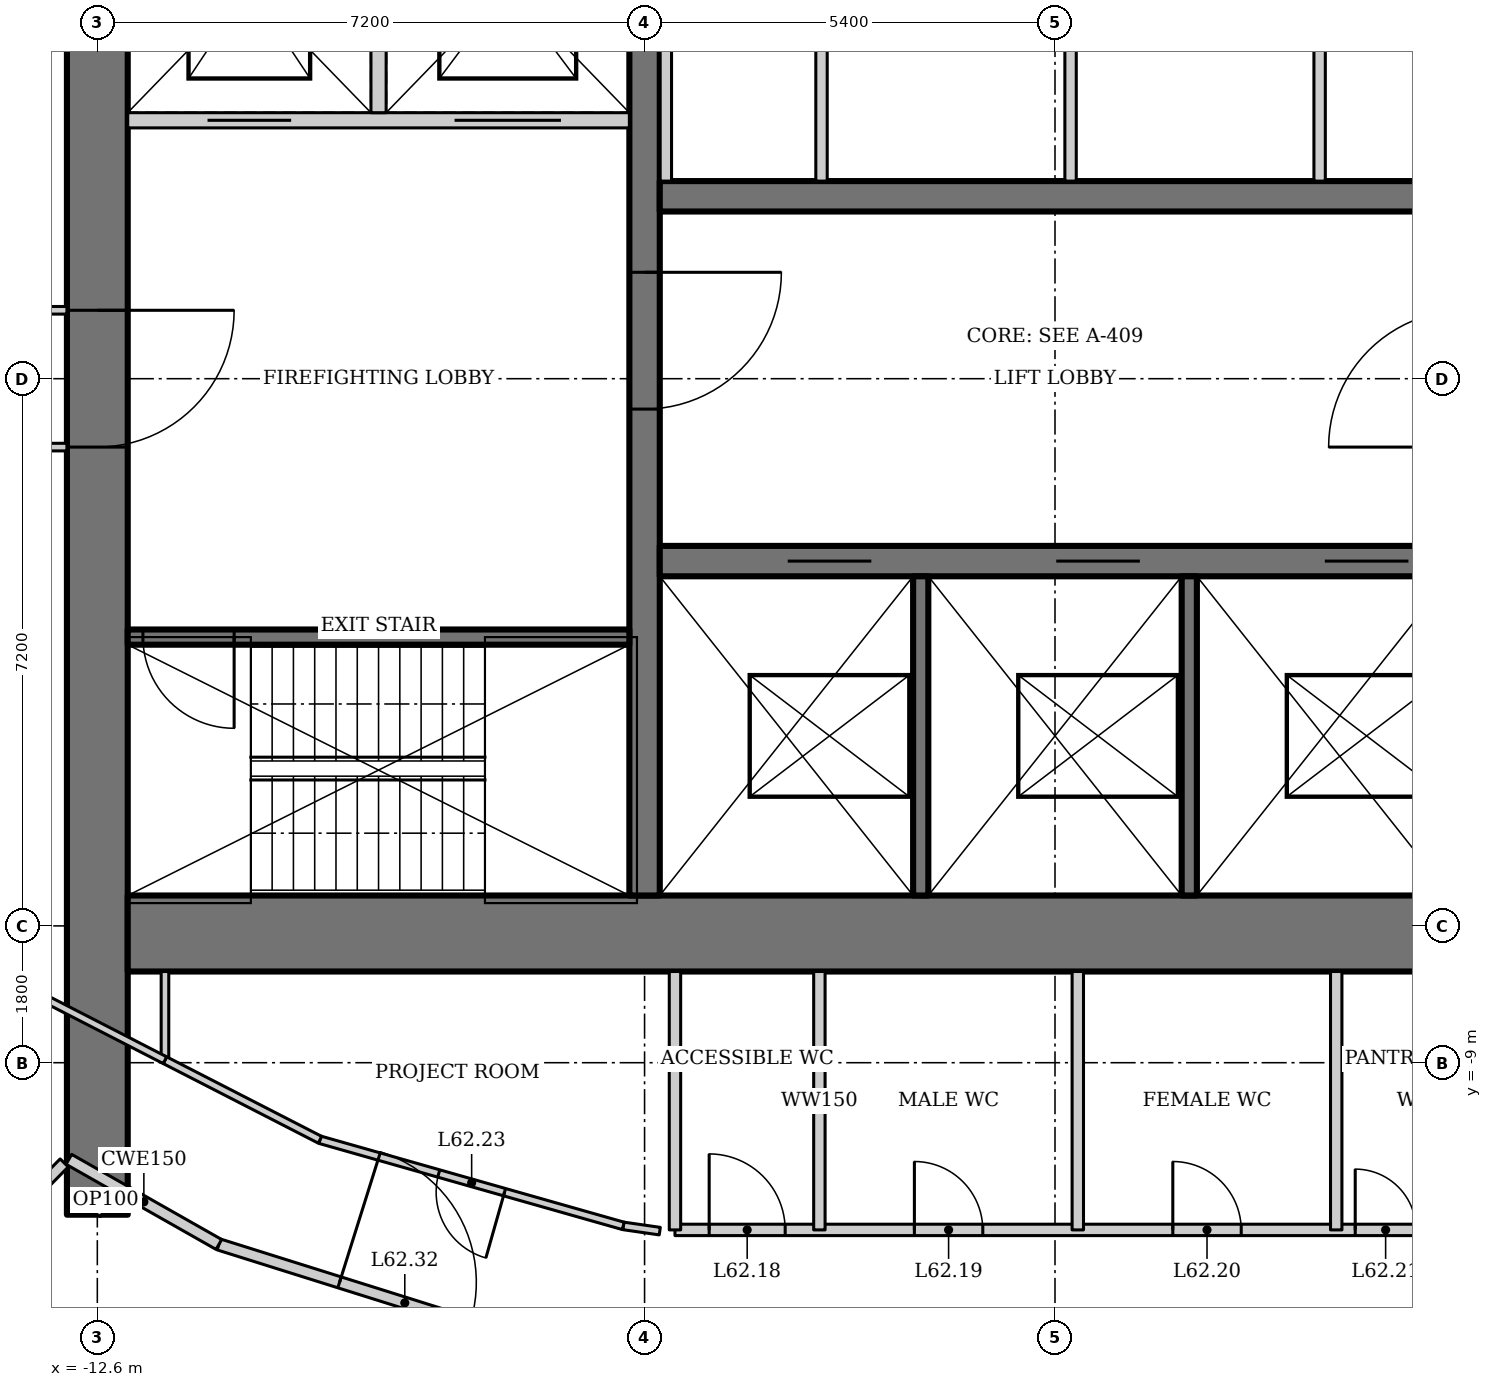
"""IFC4 building model, lengths in metres.
Left out: names, types, materials, properties, quantities, classifications, styles, units other than length and angle.
Written with IfcOpenShell. Run it as: python <this file> out.ifc"""

import sys

from ifc_helpers import new_model, si_unit, direction, frame, frame_2d, origin, place, context, subcontext, project, spatial, rectangle, extrude, element, fill, save


model = new_model("IFC4")
c1 = context("Model", 3, precision=1e-05, world=origin(), true_north=direction((0.0, 1.0)))
c2 = subcontext(c1, "Body", "Model", "MODEL_VIEW")
j1 = project(units=[si_unit("LENGTHUNIT", "METRE"), si_unit("PLANEANGLEUNIT", "RADIAN")], contexts=[c1])
p1 = place(None, origin())
s1 = spatial("IfcSite", under=j1, at=p1, CompositionType="ELEMENT")
p2 = place(p1, origin())
s2 = spatial("IfcBuilding", under=s1, at=p2, CompositionType="ELEMENT")
p3 = place(p2, frame((0.0, 0.0, 266.2)))
s3 = spatial("IfcBuildingStorey", under=s2, at=p3, CompositionType="ELEMENT", Elevation=266.2)
p4 = place(p3, frame((-12.6, 11.0, 0.0), z_axis=(0.0, 0.0, 1.0), x_axis=(0.0, -1.0, 0.0)))
e1 = element("IfcWall", 1, at=p4, inside=s3, PredefinedType="SHEAR", context=c2, shape_type="SweptSolid", body=[
    extrude(rectangle(XDim=22.0, YDim=0.8, at=frame_2d((11.0, 0.0))), origin(), (0.0, 0.0, 1.0), 4.2),
])
p5 = place(p4, frame((10.1, 0.0, 0.0)))
e2 = element("IfcOpeningElement", 2, at=p5, cuts=e1, PredefinedType="OPENING", context=c2, shape_type="SweptSolid", body=[
    extrude(rectangle(XDim=1.8, YDim=2.1, at=frame_2d((0.9, 1.05))), frame((0.0, 0.41, 0.0), z_axis=(0.0, -1.0, 0.0), x_axis=(1.0, 0.0, 0.0)), (0.0, 0.0, 1.0), 0.82),
])
p6 = place(p3, frame((-12.2, -7.3, 0.0), z_axis=(0.0, 0.0, 1.0), x_axis=(1.0, 0.0, 0.0)))
e3 = element("IfcWall", 3, at=p6, inside=s3, PredefinedType="SHEAR", context=c2, shape_type="SweptSolid", body=[
    extrude(rectangle(XDim=24.4, YDim=1.0, at=frame_2d((12.2, 0.0))), origin(), (0.0, 0.0, 1.0), 4.2),
])
p7 = place(p3, frame((-5.4, 7.8, 0.0), z_axis=(0.0, 0.0, 1.0), x_axis=(0.0, -1.0, 0.0)))
e4 = element("IfcWall", 4, at=p7, inside=s3, PredefinedType="SHEAR", context=c2, shape_type="SweptSolid", body=[
    extrude(rectangle(XDim=14.6, YDim=0.4, at=frame_2d((7.3, 0.0))), origin(), (0.0, 0.0, 1.0), 4.2),
])
p8 = place(p7, frame((6.4, 0.0, 0.0)))
e5 = element("IfcOpeningElement", 5, at=p8, cuts=e4, PredefinedType="OPENING", context=c2, shape_type="SweptSolid", body=[
    extrude(rectangle(XDim=1.8, YDim=2.1, at=frame_2d((0.9, 1.05))), frame((0.0, 0.21, 0.0), z_axis=(0.0, -1.0, 0.0), x_axis=(1.0, 0.0, 0.0)), (0.0, 0.0, 1.0), 0.42),
])
p9 = place(p3, frame((-5.2, -2.4, 0.0), z_axis=(0.0, 0.0, 1.0), x_axis=(1.0, 0.0, 0.0)))
e6 = element("IfcWall", 6, at=p9, inside=s3, PredefinedType="SHEAR", context=c2, shape_type="SweptSolid", body=[
    extrude(rectangle(XDim=10.4, YDim=0.4, at=frame_2d((5.2, 0.0))), origin(), (0.0, 0.0, 1.0), 4.2),
])
p10 = place(p9, frame((1.683, 0.0, 0.0)))
e7 = element("IfcOpeningElement", 7, at=p10, cuts=e6, PredefinedType="OPENING", context=c2, shape_type="SweptSolid", body=[
    extrude(rectangle(XDim=1.1, YDim=2.2, at=frame_2d((0.55, 1.1))), frame((0.0, 0.21, 0.0), z_axis=(0.0, -1.0, 0.0), x_axis=(1.0, 0.0, 0.0)), (0.0, 0.0, 1.0), 0.42),
])
p11 = place(p9, frame((5.217, 0.0, 0.0)))
e8 = element("IfcOpeningElement", 8, at=p11, cuts=e6, PredefinedType="OPENING", context=c2, shape_type="SweptSolid", body=[
    extrude(rectangle(XDim=1.1, YDim=2.2, at=frame_2d((0.55, 1.1))), frame((0.0, 0.21, 0.0), z_axis=(0.0, -1.0, 0.0), x_axis=(1.0, 0.0, 0.0)), (0.0, 0.0, 1.0), 0.42),
])
p12 = place(p9, frame((8.75, 0.0, 0.0)))
e9 = element("IfcOpeningElement", 9, at=p12, cuts=e6, PredefinedType="OPENING", context=c2, shape_type="SweptSolid", body=[
    extrude(rectangle(XDim=1.1, YDim=2.2, at=frame_2d((0.55, 1.1))), frame((0.0, 0.21, 0.0), z_axis=(0.0, -1.0, 0.0), x_axis=(1.0, 0.0, 0.0)), (0.0, 0.0, 1.0), 0.42),
])
for number, where, z_axis, x_axis in (
    (10, (-1.767, -2.6, 0.0), (0.0, 0.0, 1.0), (0.0, -1.0, 0.0)),
    (11, (1.767, -2.6, 0.0), (0.0, 0.0, 1.0), (0.0, -1.0, 0.0)),
):
    element("IfcWall", number, at=place(p3, frame(where, z_axis=z_axis, x_axis=x_axis)), inside=s3, PredefinedType="SOLIDWALL", context=c2, shape_type="SweptSolid", body=[
        extrude(rectangle(XDim=4.2, YDim=0.2, at=frame_2d((2.1, 0.0))), origin(), (0.0, 0.0, 1.0), 4.2),
    ])
p13 = place(p3, frame((5.2, 2.4, 0.0), z_axis=(0.0, 0.0, 1.0), x_axis=(-1.0, 0.0, 0.0)))
e12 = element("IfcWall", 12, at=p13, inside=s3, PredefinedType="SHEAR", context=c2, shape_type="SweptSolid", body=[
    extrude(rectangle(XDim=10.4, YDim=0.4, at=frame_2d((5.2, 0.0))), origin(), (0.0, 0.0, 1.0), 4.2),
])
p14 = place(p3, frame((-5.6, -3.4, 0.0), z_axis=(0.0, 0.0, 1.0), x_axis=(-1.0, 0.0, 0.0)))
e13 = element("IfcWall", 13, at=p14, inside=s3, PredefinedType="SHEAR", context=c2, shape_type="SweptSolid", body=[
    extrude(rectangle(XDim=6.6, YDim=0.2, at=frame_2d((3.3, 0.0))), origin(), (0.0, 0.0, 1.0), 4.2),
])
p15 = place(p14, frame((5.2, 0.0, 0.0)))
e14 = element("IfcOpeningElement", 14, at=p15, cuts=e13, PredefinedType="OPENING", context=c2, shape_type="SweptSolid", body=[
    extrude(rectangle(XDim=1.2, YDim=2.1, at=frame_2d((0.6, 1.05))), frame((0.0, 0.11, 0.0), z_axis=(0.0, -1.0, 0.0), x_axis=(1.0, 0.0, 0.0)), (0.0, 0.0, 1.0), 0.22),
])
p16 = place(p3, frame((-12.2, 3.4, 0.0), z_axis=(0.0, 0.0, 1.0), x_axis=(1.0, 0.0, 0.0)))
e15 = element("IfcWall", 15, at=p16, inside=s3, PredefinedType="SOLIDWALL", context=c2, shape_type="SweptSolid", body=[
    extrude(rectangle(XDim=6.6, YDim=0.2, at=frame_2d((3.3, 0.0))), origin(), (0.0, 0.0, 1.0), 4.2),
])
p17 = place(p16, frame((1.05, 0.0, 0.0)))
e16 = element("IfcOpeningElement", 16, at=p17, cuts=e15, PredefinedType="OPENING", context=c2, shape_type="SweptSolid", body=[
    extrude(rectangle(XDim=1.1, YDim=2.2, at=frame_2d((0.55, 1.1))), frame((0.0, 0.11, 0.0), z_axis=(0.0, -1.0, 0.0), x_axis=(1.0, 0.0, 0.0)), (0.0, 0.0, 1.0), 0.22),
])
p18 = place(p16, frame((4.3, 0.0, 0.0)))
e17 = element("IfcOpeningElement", 17, at=p18, cuts=e15, PredefinedType="OPENING", context=c2, shape_type="SweptSolid", body=[
    extrude(rectangle(XDim=1.4, YDim=2.2, at=frame_2d((0.7, 1.1))), frame((0.0, 0.11, 0.0), z_axis=(0.0, -1.0, 0.0), x_axis=(1.0, 0.0, 0.0)), (0.0, 0.0, 1.0), 0.22),
])
p19 = place(p3, frame((-8.9, 3.5, 0.0), z_axis=(0.0, 0.0, 1.0), x_axis=(0.0, 1.0, 0.0)))
e18 = element("IfcWall", 18, at=p19, inside=s3, PredefinedType="SOLIDWALL", context=c2, shape_type="SweptSolid", body=[
    extrude(rectangle(XDim=3.3, YDim=0.2, at=frame_2d((1.65, 0.0))), origin(), (0.0, 0.0, 1.0), 4.2),
])
p20 = place(p3, frame((-11.001, -11.392, 0.0), z_axis=(0.0, 0.0, 1.0), x_axis=(0.954031103669, -0.299707612903, 0.0)))
e19 = element("IfcWall", 19, at=p20, inside=s3, PredefinedType="PARTITIONING", context=c2, shape_type="SweptSolid", body=[
    extrude(rectangle(XDim=4.695, YDim=0.15, at=frame_2d((2.348, 0.0))), origin(), (0.0, 0.0, 1.0), 4.05),
])
p21 = place(p20, frame((1.664, 0.0, 0.0)))
e20 = element("IfcOpeningElement", 20, at=p21, cuts=e19, PredefinedType="OPENING", context=c2, shape_type="SweptSolid", body=[
    extrude(rectangle(XDim=1.8, YDim=2.1, at=frame_2d((0.9, 1.05))), frame((0.0, 0.085, 0.0), z_axis=(0.0, -1.0, 0.0), x_axis=(1.0, 0.0, 0.0)), (0.0, 0.0, 1.0), 0.17),
])
for number, where, z_axis, x_axis in (
    (21, (-5.12, 2.6, 0.0), (0.0, 0.0, 1.0), (0.0, 1.0, 0.0)),
    (22, (-3.072, 2.6, 0.0), (0.0, 0.0, 1.0), (0.0, 1.0, 0.0)),
    (23, (0.205, 2.6, 0.0), (0.0, 0.0, 1.0), (0.0, 1.0, 0.0)),
    (24, (3.482, 2.6, 0.0), (0.0, 0.0, 1.0), (0.0, 1.0, 0.0)),
):
    element("IfcWall", number, at=place(p3, frame(where, z_axis=z_axis, x_axis=x_axis)), inside=s3, PredefinedType="SOLIDWALL", context=c2, shape_type="SweptSolid", body=[
        extrude(rectangle(XDim=4.4, YDim=0.15, at=frame_2d((2.2, 0.0))), origin(), (0.0, 0.0, 1.0), 4.05),
    ])
p22 = place(p3, frame((-5.0, -11.2, 0.0), z_axis=(0.0, 0.0, 1.0), x_axis=(1.0, 0.0, 0.0)))
e25 = element("IfcWall", 25, at=p22, inside=s3, PredefinedType="SOLIDWALL", context=c2, shape_type="SweptSolid", body=[
    extrude(rectangle(XDim=10.0, YDim=0.15, at=frame_2d((5.0, 0.0))), origin(), (0.0, 0.0, 1.0), 4.05),
])
p23 = place(p22, frame((0.45, 0.0, 0.0)))
e26 = element("IfcOpeningElement", 26, at=p23, cuts=e25, PredefinedType="OPENING", context=c2, shape_type="SweptSolid", body=[
    extrude(rectangle(XDim=1.0, YDim=2.1, at=frame_2d((0.5, 1.05))), frame((0.0, 0.085, 0.0), z_axis=(0.0, -1.0, 0.0), x_axis=(1.0, 0.0, 0.0)), (0.0, 0.0, 1.0), 0.17),
])
p24 = place(p22, frame((3.15, 0.0, 0.0)))
e27 = element("IfcOpeningElement", 27, at=p24, cuts=e25, PredefinedType="OPENING", context=c2, shape_type="SweptSolid", body=[
    extrude(rectangle(XDim=0.9, YDim=2.1, at=frame_2d((0.45, 1.05))), frame((0.0, 0.085, 0.0), z_axis=(0.0, -1.0, 0.0), x_axis=(1.0, 0.0, 0.0)), (0.0, 0.0, 1.0), 0.17),
])
p25 = place(p22, frame((6.55, 0.0, 0.0)))
e28 = element("IfcOpeningElement", 28, at=p25, cuts=e25, PredefinedType="OPENING", context=c2, shape_type="SweptSolid", body=[
    extrude(rectangle(XDim=0.9, YDim=2.1, at=frame_2d((0.45, 1.05))), frame((0.0, 0.085, 0.0), z_axis=(0.0, -1.0, 0.0), x_axis=(1.0, 0.0, 0.0)), (0.0, 0.0, 1.0), 0.17),
])
p26 = place(p22, frame((8.95, 0.0, 0.0)))
e29 = element("IfcOpeningElement", 29, at=p26, cuts=e25, PredefinedType="OPENING", context=c2, shape_type="SweptSolid", body=[
    extrude(rectangle(XDim=0.8, YDim=2.1, at=frame_2d((0.4, 1.05))), frame((0.0, 0.085, 0.0), z_axis=(0.0, -1.0, 0.0), x_axis=(1.0, 0.0, 0.0)), (0.0, 0.0, 1.0), 0.17),
])
for number, where, z_axis, x_axis in (
    (30, (-5.0, -7.8, 0.0), (0.0, 0.0, 1.0), (0.0, -1.0, 0.0)),
    (31, (-3.1, -7.8, 0.0), (0.0, 0.0, 1.0), (0.0, -1.0, 0.0)),
    (32, (0.3, -7.8, 0.0), (0.0, 0.0, 1.0), (0.0, -1.0, 0.0)),
    (33, (3.7, -7.8, 0.0), (0.0, 0.0, 1.0), (0.0, -1.0, 0.0)),
):
    element("IfcWall", number, at=place(p3, frame(where, z_axis=z_axis, x_axis=x_axis)), inside=s3, PredefinedType="SOLIDWALL", context=c2, shape_type="SweptSolid", body=[
        extrude(rectangle(XDim=3.4, YDim=0.15, at=frame_2d((1.7, 0.0))), origin(), (0.0, 0.0, 1.0), 4.05),
    ])
p27 = place(p3, frame((-11.71, -7.8, 0.0), z_axis=(0.0, 0.0, 1.0), x_axis=(0.0, -1.0, 0.0)))
e34 = element("IfcWall", 34, at=p27, inside=s3, PredefinedType="PARTITIONING", context=c2, shape_type="SweptSolid", body=[
    extrude(rectangle(XDim=1.167, YDim=0.1, at=frame_2d((0.583, 0.0))), origin(), (0.0, 0.0, 1.0), 4.05),
])
p28 = place(p3, frame((-5.2, -11.216, 0.0), z_axis=(0.0, 0.0, 1.0), x_axis=(-0.989797891768, 0.142478536811, 0.0)))
e35 = element("IfcWall", 35, at=p28, inside=s3, PredefinedType="PARTITIONING", context=c2, shape_type="SweptSolid", body=[
    extrude(rectangle(XDim=0.485, YDim=0.1, at=frame_2d((0.242, 0.0))), origin(), (0.0, 0.0, 1.0), 4.05),
])
p29 = place(p3, frame((-5.68, -11.147, 0.0), z_axis=(0.0, 0.0, 1.0), x_axis=(-0.961973498971, 0.273142796496, 0.0)))
e36 = element("IfcWall", 36, at=p29, inside=s3, PredefinedType="PARTITIONING", context=c2, shape_type="SweptSolid", body=[
    extrude(rectangle(XDim=4.148, YDim=0.1, at=frame_2d((2.074, 0.0))), origin(), (0.0, 0.0, 1.0), 4.05),
])
p30 = place(p29, frame((1.624, 0.0, 0.0)))
e37 = element("IfcOpeningElement", 37, at=p30, cuts=e36, PredefinedType="OPENING", context=c2, shape_type="SweptSolid", body=[
    extrude(rectangle(XDim=0.9, YDim=2.1, at=frame_2d((0.45, 1.05))), frame((0.0, 0.06, 0.0), z_axis=(0.0, -1.0, 0.0), x_axis=(1.0, 0.0, 0.0)), (0.0, 0.0, 1.0), 0.12),
])
p31 = place(p3, frame((-9.67, -10.014, 0.0), z_axis=(0.0, 0.0, 1.0), x_axis=(-0.889605609385, 0.456729525814, 0.0)))
e38 = element("IfcWall", 38, at=p31, inside=s3, PredefinedType="PARTITIONING", context=c2, shape_type="SweptSolid", body=[
    extrude(rectangle(XDim=2.293, YDim=0.1, at=frame_2d((1.146, 0.0))), origin(), (0.0, 0.0, 1.0), 4.05),
])
p32 = place(p3, frame((-12.6, -11.0, 0.0), z_axis=(0.0, 0.0, 1.0), x_axis=(0.493794495037, 0.869578631678, 0.0)))
e39 = element("IfcWall", 39, at=p32, inside=s3, PredefinedType="PARTITIONING", context=c2, shape_type="SweptSolid", body=[
    extrude(rectangle(XDim=0.449, YDim=0.1, at=frame_2d((0.225, 0.0))), origin(), (0.0, 0.0, 1.0), 4.05),
])
p33 = place(p3, frame((-15.165, -0.9, 0.0), z_axis=(0.0, 0.0, 1.0), x_axis=(1.0, 0.0, 0.0)))
e40 = element("IfcWall", 40, at=p33, inside=s3, PredefinedType="PARTITIONING", context=c2, shape_type="SweptSolid", body=[
    extrude(rectangle(XDim=2.165, YDim=0.1, at=frame_2d((1.083, 0.0))), origin(), (0.0, 0.0, 1.0), 4.05),
])
p34 = place(p33, frame((0.1, 0.0, 0.0)))
e41 = element("IfcOpeningElement", 41, at=p34, cuts=e40, PredefinedType="OPENING", context=c2, shape_type="SweptSolid", body=[
    extrude(rectangle(XDim=0.9, YDim=2.1, at=frame_2d((0.45, 1.05))), frame((0.0, 0.06, 0.0), z_axis=(0.0, -1.0, 0.0), x_axis=(1.0, 0.0, 0.0)), (0.0, 0.0, 1.0), 0.12),
])
p35 = place(p3, frame((-13.0, 0.9, 0.0), z_axis=(0.0, 0.0, 1.0), x_axis=(-1.0, 0.0, 0.0)))
e42 = element("IfcWall", 42, at=p35, inside=s3, PredefinedType="PARTITIONING", context=c2, shape_type="SweptSolid", body=[
    extrude(rectangle(XDim=2.165, YDim=0.1, at=frame_2d((1.083, 0.0))), origin(), (0.0, 0.0, 1.0), 4.05),
])
p36 = place(p35, frame((1.15, 0.0, 0.0)))
e43 = element("IfcOpeningElement", 43, at=p36, cuts=e42, PredefinedType="OPENING", context=c2, shape_type="SweptSolid", body=[
    extrude(rectangle(XDim=0.9, YDim=2.1, at=frame_2d((0.45, 1.05))), frame((0.0, 0.06, 0.0), z_axis=(0.0, -1.0, 0.0), x_axis=(1.0, 0.0, 0.0)), (0.0, 0.0, 1.0), 0.12),
])
p37 = place(p3, frame((-12.975, -10.271, 0.0), z_axis=(0.0, 0.0, 1.0), x_axis=(0.869722107117, -0.493541747366, 0.0)))
e44 = element("IfcWall", 44, at=p37, inside=s3, PredefinedType="PARTITIONING", context=c2, shape_type="SweptSolid", body=[
    extrude(rectangle(XDim=2.27, YDim=0.15, at=frame_2d((1.135, 0.0))), origin(), (0.0, 0.0, 1.0), 4.05),
])
p38 = place(p3, frame((-11.71, -8.967, 0.0), z_axis=(0.0, 0.0, 1.0), x_axis=(-0.889638356137, 0.456665736935, 0.0)))
e45 = element("IfcWall", 45, at=p38, inside=s3, PredefinedType="PARTITIONING", context=c2, shape_type="SweptSolid", body=[
    extrude(rectangle(XDim=1.917, YDim=0.1, at=frame_2d((0.958, 0.0))), origin(), (0.0, 0.0, 1.0), 4.05),
])
p39 = place(p3, frame((-13.036, -10.319, 0.0), z_axis=(0.0, 0.0, 1.0), x_axis=(-0.701113567316, -0.713049623606, 0.0)))
e46 = element("IfcWall", 46, at=p39, inside=s3, PredefinedType="PARTITIONING", context=c2, shape_type="SweptSolid", body=[
    extrude(rectangle(XDim=1.411, YDim=0.15, at=frame_2d((0.706, 0.0))), origin(), (0.0, 0.0, 1.0), 4.05),
])
p40 = place(p8, origin())
e47 = element("IfcDoor", 47, at=p40, inside=s3, OperationType="DOUBLE_DOOR_DOUBLE_SWING", PredefinedType="DOOR", context=c2, shape_type="SweptSolid", body=[
    extrude(rectangle(XDim=1.8, YDim=2.1, at=frame_2d((0.9, 1.05))), frame((0.0, 0.025, 0.0), z_axis=(0.0, -1.0, 0.0), x_axis=(1.0, 0.0, 0.0)), (0.0, 0.0, 1.0), 0.05),
])
fill(e5, e47)
p41 = place(p15, origin())
e48 = element("IfcDoor", 48, at=p41, inside=s3, OperationType="SINGLE_SWING_RIGHT", PredefinedType="DOOR", context=c2, shape_type="SweptSolid", body=[
    extrude(rectangle(XDim=1.2, YDim=2.1, at=frame_2d((0.6, 1.05))), frame((0.0, 0.025, 0.0), z_axis=(0.0, -1.0, 0.0), x_axis=(1.0, 0.0, 0.0)), (0.0, 0.0, 1.0), 0.05),
])
fill(e14, e48)
p42 = place(p5, origin())
e49 = element("IfcDoor", 49, at=p42, inside=s3, OperationType="DOUBLE_DOOR_DOUBLE_SWING", PredefinedType="DOOR", context=c2, shape_type="SweptSolid", body=[
    extrude(rectangle(XDim=1.8, YDim=2.1, at=frame_2d((0.9, 1.05))), frame((0.0, 0.025, 0.0), z_axis=(0.0, -1.0, 0.0), x_axis=(1.0, 0.0, 0.0)), (0.0, 0.0, 1.0), 0.05),
])
fill(e2, e49)
p43 = place(p10, origin())
e50 = element("IfcDoor", 50, at=p43, inside=s3, OperationType="DOUBLE_DOOR_SLIDING", PredefinedType="DOOR", context=c2, shape_type="SweptSolid", body=[
    extrude(rectangle(XDim=1.1, YDim=2.2, at=frame_2d((0.55, 1.1))), frame((0.0, 0.025, 0.0), z_axis=(0.0, -1.0, 0.0), x_axis=(1.0, 0.0, 0.0)), (0.0, 0.0, 1.0), 0.05),
])
fill(e7, e50)
p44 = place(p11, origin())
e51 = element("IfcDoor", 51, at=p44, inside=s3, OperationType="DOUBLE_DOOR_SLIDING", PredefinedType="DOOR", context=c2, shape_type="SweptSolid", body=[
    extrude(rectangle(XDim=1.1, YDim=2.2, at=frame_2d((0.55, 1.1))), frame((0.0, 0.025, 0.0), z_axis=(0.0, -1.0, 0.0), x_axis=(1.0, 0.0, 0.0)), (0.0, 0.0, 1.0), 0.05),
])
fill(e8, e51)
p45 = place(p12, origin())
e52 = element("IfcDoor", 52, at=p45, inside=s3, OperationType="DOUBLE_DOOR_SLIDING", PredefinedType="DOOR", context=c2, shape_type="SweptSolid", body=[
    extrude(rectangle(XDim=1.1, YDim=2.2, at=frame_2d((0.55, 1.1))), frame((0.0, 0.025, 0.0), z_axis=(0.0, -1.0, 0.0), x_axis=(1.0, 0.0, 0.0)), (0.0, 0.0, 1.0), 0.05),
])
fill(e9, e52)
p46 = place(p17, origin())
e53 = element("IfcDoor", 53, at=p46, inside=s3, OperationType="DOUBLE_DOOR_SLIDING", PredefinedType="DOOR", context=c2, shape_type="SweptSolid", body=[
    extrude(rectangle(XDim=1.1, YDim=2.2, at=frame_2d((0.55, 1.1))), frame((0.0, 0.025, 0.0), z_axis=(0.0, -1.0, 0.0), x_axis=(1.0, 0.0, 0.0)), (0.0, 0.0, 1.0), 0.05),
])
fill(e16, e53)
p47 = place(p18, origin())
e54 = element("IfcDoor", 54, at=p47, inside=s3, OperationType="DOUBLE_DOOR_SLIDING", PredefinedType="DOOR", context=c2, shape_type="SweptSolid", body=[
    extrude(rectangle(XDim=1.4, YDim=2.2, at=frame_2d((0.7, 1.1))), frame((0.0, 0.025, 0.0), z_axis=(0.0, -1.0, 0.0), x_axis=(1.0, 0.0, 0.0)), (0.0, 0.0, 1.0), 0.05),
])
fill(e17, e54)
p48 = place(p23, origin())
e55 = element("IfcDoor", 55, at=p48, inside=s3, OperationType="SINGLE_SWING_LEFT", PredefinedType="DOOR", context=c2, shape_type="SweptSolid", body=[
    extrude(rectangle(XDim=1.0, YDim=2.1, at=frame_2d((0.5, 1.05))), frame((0.0, 0.025, 0.0), z_axis=(0.0, -1.0, 0.0), x_axis=(1.0, 0.0, 0.0)), (0.0, 0.0, 1.0), 0.05),
])
fill(e26, e55)
p49 = place(p24, origin())
e56 = element("IfcDoor", 56, at=p49, inside=s3, OperationType="SINGLE_SWING_LEFT", PredefinedType="DOOR", context=c2, shape_type="SweptSolid", body=[
    extrude(rectangle(XDim=0.9, YDim=2.1, at=frame_2d((0.45, 1.05))), frame((0.0, 0.025, 0.0), z_axis=(0.0, -1.0, 0.0), x_axis=(1.0, 0.0, 0.0)), (0.0, 0.0, 1.0), 0.05),
])
fill(e27, e56)
p50 = place(p25, origin())
e57 = element("IfcDoor", 57, at=p50, inside=s3, OperationType="SINGLE_SWING_LEFT", PredefinedType="DOOR", context=c2, shape_type="SweptSolid", body=[
    extrude(rectangle(XDim=0.9, YDim=2.1, at=frame_2d((0.45, 1.05))), frame((0.0, 0.025, 0.0), z_axis=(0.0, -1.0, 0.0), x_axis=(1.0, 0.0, 0.0)), (0.0, 0.0, 1.0), 0.05),
])
fill(e28, e57)
p51 = place(p26, origin())
e58 = element("IfcDoor", 58, at=p51, inside=s3, OperationType="SINGLE_SWING_LEFT", PredefinedType="DOOR", context=c2, shape_type="SweptSolid", body=[
    extrude(rectangle(XDim=0.8, YDim=2.1, at=frame_2d((0.4, 1.05))), frame((0.0, 0.025, 0.0), z_axis=(0.0, -1.0, 0.0), x_axis=(1.0, 0.0, 0.0)), (0.0, 0.0, 1.0), 0.05),
])
fill(e29, e58)
p52 = place(p30, origin())
e59 = element("IfcDoor", 59, at=p52, inside=s3, OperationType="SINGLE_SWING_LEFT", PredefinedType="DOOR", context=c2, shape_type="SweptSolid", body=[
    extrude(rectangle(XDim=0.9, YDim=2.1, at=frame_2d((0.45, 1.05))), frame((0.0, 0.025, 0.0), z_axis=(0.0, -1.0, 0.0), x_axis=(1.0, 0.0, 0.0)), (0.0, 0.0, 1.0), 0.05),
])
fill(e37, e59)
p53 = place(p21, origin())
e60 = element("IfcDoor", 60, at=p53, inside=s3, OperationType="DOUBLE_DOOR_DOUBLE_SWING", PredefinedType="DOOR", context=c2, shape_type="SweptSolid", body=[
    extrude(rectangle(XDim=1.8, YDim=2.1, at=frame_2d((0.9, 1.05))), frame((0.0, 0.025, 0.0), z_axis=(0.0, -1.0, 0.0), x_axis=(1.0, 0.0, 0.0)), (0.0, 0.0, 1.0), 0.05),
])
fill(e20, e60)
save(model, sys.argv[1])
